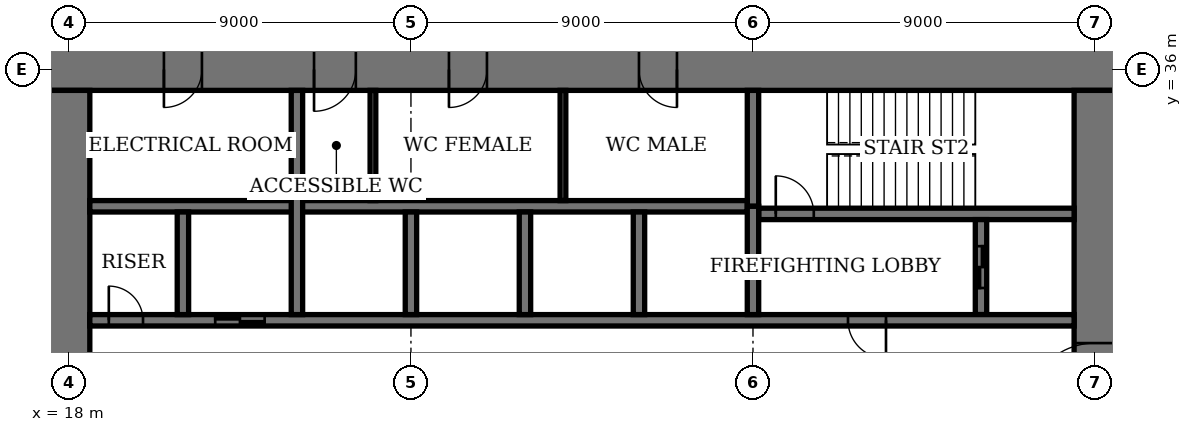
"""IFC4 building model, lengths in metres.
Left out: names, types, materials, properties, quantities, classifications, styles, units other than length and angle.
Written with IfcOpenShell. Run it as: python <this file> out.ifc"""

import sys

from ifc_helpers import new_model, si_unit, direction, frame, frame_2d, origin, place, context, subcontext, project, spatial, rectangle, extrude, element, fill, save


model = new_model("IFC4")
c1 = context("Model", 3, precision=1e-05, world=origin(), true_north=direction((0.0, 1.0)))
c2 = subcontext(c1, "Body", "Model", "MODEL_VIEW")
j1 = project(units=[si_unit("LENGTHUNIT", "METRE"), si_unit("PLANEANGLEUNIT", "RADIAN")], contexts=[c1])
p1 = place(None, origin())
s1 = spatial("IfcSite", under=j1, at=p1, CompositionType="ELEMENT")
p2 = place(p1, origin())
s2 = spatial("IfcBuilding", under=s1, at=p2, CompositionType="ELEMENT")
p3 = place(p2, frame((0.0, 0.0, 27.8)))
s3 = spatial("IfcBuildingStorey", under=s2, at=p3, CompositionType="ELEMENT", Elevation=27.8)
p4 = place(p3, frame((45.55, 36.0, 0.0), z_axis=(0.0, 0.0, 1.0), x_axis=(-1.0, 0.0, 0.0)))
e1 = element("IfcWall", 1, at=p4, inside=s3, PredefinedType="SHEAR", context=c2, shape_type="SweptSolid", body=[
    extrude(rectangle(XDim=28.1, YDim=1.1, at=frame_2d((14.05, 0.0))), origin(), (0.0, 0.0, 1.0), 4.0),
])
p5 = place(p4, frame((11.55, 0.0, 0.0)))
e2 = element("IfcOpeningElement", 2, at=p5, cuts=e1, PredefinedType="OPENING", context=c2, shape_type="SweptSolid", body=[
    extrude(rectangle(XDim=1.0, YDim=2.4, at=frame_2d((0.5, 1.2))), frame((0.0, 0.56, 0.0), z_axis=(0.0, -1.0, 0.0), x_axis=(1.0, 0.0, 0.0)), (0.0, 0.0, 1.0), 1.12),
])
p6 = place(p4, frame((16.55, 0.0, 0.0)))
e3 = element("IfcOpeningElement", 3, at=p6, cuts=e1, PredefinedType="OPENING", context=c2, shape_type="SweptSolid", body=[
    extrude(rectangle(XDim=1.0, YDim=2.4, at=frame_2d((0.5, 1.2))), frame((0.0, 0.56, 0.0), z_axis=(0.0, -1.0, 0.0), x_axis=(1.0, 0.0, 0.0)), (0.0, 0.0, 1.0), 1.12),
])
p7 = place(p4, frame((20.0, 0.0, 0.0)))
e4 = element("IfcOpeningElement", 4, at=p7, cuts=e1, PredefinedType="OPENING", context=c2, shape_type="SweptSolid", body=[
    extrude(rectangle(XDim=1.1, YDim=2.4, at=frame_2d((0.55, 1.2))), frame((0.0, 0.56, 0.0), z_axis=(0.0, -1.0, 0.0), x_axis=(1.0, 0.0, 0.0)), (0.0, 0.0, 1.0), 1.12),
])
p8 = place(p4, frame((24.05, 0.0, 0.0)))
e5 = element("IfcOpeningElement", 5, at=p8, cuts=e1, PredefinedType="OPENING", context=c2, shape_type="SweptSolid", body=[
    extrude(rectangle(XDim=1.0, YDim=2.4, at=frame_2d((0.5, 1.2))), frame((0.0, 0.56, 0.0), z_axis=(0.0, -1.0, 0.0), x_axis=(1.0, 0.0, 0.0)), (0.0, 0.0, 1.0), 1.12),
])
p9 = place(p3, frame((18.0, 35.45, 0.0), z_axis=(0.0, 0.0, 1.0), x_axis=(0.0, -1.0, 0.0)))
e6 = element("IfcWall", 6, at=p9, inside=s3, PredefinedType="SHEAR", context=c2, shape_type="SweptSolid", body=[
    extrude(rectangle(XDim=16.9, YDim=1.1, at=frame_2d((8.45, 0.0))), origin(), (0.0, 0.0, 1.0), 4.0),
])
p10 = place(p9, frame((8.45, 0.0, 0.0)))
e7 = element("IfcOpeningElement", 7, at=p10, cuts=e6, PredefinedType="OPENING", context=c2, shape_type="SweptSolid", body=[
    extrude(rectangle(XDim=1.8, YDim=2.4, at=frame_2d((0.9, 1.2))), frame((0.0, 0.56, 0.0), z_axis=(0.0, -1.0, 0.0), x_axis=(1.0, 0.0, 0.0)), (0.0, 0.0, 1.0), 1.12),
])
p11 = place(p3, frame((45.0, 18.55, 0.0), z_axis=(0.0, 0.0, 1.0), x_axis=(0.0, 1.0, 0.0)))
e8 = element("IfcWall", 8, at=p11, inside=s3, PredefinedType="SHEAR", context=c2, shape_type="SweptSolid", body=[
    extrude(rectangle(XDim=16.9, YDim=1.1, at=frame_2d((8.45, 0.0))), origin(), (0.0, 0.0, 1.0), 4.0),
])
p12 = place(p11, frame((8.45, 0.0, 0.0)))
e9 = element("IfcOpeningElement", 9, at=p12, cuts=e8, PredefinedType="OPENING", context=c2, shape_type="SweptSolid", body=[
    extrude(rectangle(XDim=1.8, YDim=2.4, at=frame_2d((0.9, 1.2))), frame((0.0, 0.56, 0.0), z_axis=(0.0, -1.0, 0.0), x_axis=(1.0, 0.0, 0.0)), (0.0, 0.0, 1.0), 1.12),
])
p13 = place(p3, frame((36.15, 32.2, 0.0), z_axis=(0.0, 0.0, 1.0), x_axis=(1.0, 0.0, 0.0)))
e10 = element("IfcWall", 10, at=p13, inside=s3, PredefinedType="SHEAR", context=c2, shape_type="SweptSolid", body=[
    extrude(rectangle(XDim=8.3, YDim=0.3, at=frame_2d((4.15, 0.0))), origin(), (0.0, 0.0, 1.0), 4.0),
])
p14 = place(p13, frame((0.45, 0.0, 0.0)))
e11 = element("IfcOpeningElement", 11, at=p14, cuts=e10, PredefinedType="OPENING", context=c2, shape_type="SweptSolid", body=[
    extrude(rectangle(XDim=1.0, YDim=2.4, at=frame_2d((0.5, 1.2))), frame((0.0, 0.16, 0.0), z_axis=(0.0, -1.0, 0.0), x_axis=(1.0, 0.0, 0.0)), (0.0, 0.0, 1.0), 0.32),
])
p15 = place(p3, frame((36.0, 32.4, 0.0), z_axis=(0.0, 0.0, 1.0), x_axis=(0.0, 1.0, 0.0)))
e12 = element("IfcWall", 12, at=p15, inside=s3, PredefinedType="SHEAR", context=c2, shape_type="SweptSolid", body=[
    extrude(rectangle(XDim=3.05, YDim=0.3, at=frame_2d((1.525, 0.0))), origin(), (0.0, 0.0, 1.0), 4.0),
])
p16 = place(p3, frame((42.0, 29.55, 0.0), z_axis=(0.0, 0.0, 1.0), x_axis=(0.0, 1.0, 0.0)))
e13 = element("IfcWall", 13, at=p16, inside=s3, PredefinedType="SHEAR", context=c2, shape_type="SweptSolid", body=[
    extrude(rectangle(XDim=2.5, YDim=0.3, at=frame_2d((1.25, 0.0))), origin(), (0.0, 0.0, 1.0), 4.0),
])
p17 = place(p16, frame((0.7, 0.0, 0.0)))
e14 = element("IfcOpeningElement", 14, at=p17, cuts=e13, PredefinedType="OPENING", context=c2, shape_type="SweptSolid", body=[
    extrude(rectangle(XDim=1.1, YDim=2.4, at=frame_2d((0.55, 1.2))), frame((0.0, 0.16, 0.0), z_axis=(0.0, -1.0, 0.0), x_axis=(1.0, 0.0, 0.0)), (0.0, 0.0, 1.0), 0.32),
])
p18 = place(p3, frame((18.55, 29.4, 0.0), z_axis=(0.0, 0.0, 1.0), x_axis=(1.0, 0.0, 0.0)))
e15 = element("IfcWall", 15, at=p18, inside=s3, PredefinedType="SHEAR", context=c2, shape_type="SweptSolid", body=[
    extrude(rectangle(XDim=25.9, YDim=0.3, at=frame_2d((12.95, 0.0))), origin(), (0.0, 0.0, 1.0), 4.0),
])
p19 = place(p18, frame((19.95, 0.0, 0.0)))
e16 = element("IfcOpeningElement", 16, at=p19, cuts=e15, PredefinedType="OPENING", context=c2, shape_type="SweptSolid", body=[
    extrude(rectangle(XDim=1.0, YDim=2.4, at=frame_2d((0.5, 1.2))), frame((0.0, 0.16, 0.0), z_axis=(0.0, -1.0, 0.0), x_axis=(1.0, 0.0, 0.0)), (0.0, 0.0, 1.0), 0.32),
])
p20 = place(p18, frame((0.5, 0.0, 0.0)))
e17 = element("IfcOpeningElement", 17, at=p20, cuts=e15, PredefinedType="OPENING", context=c2, shape_type="SweptSolid", body=[
    extrude(rectangle(XDim=0.9, YDim=2.1, at=frame_2d((0.45, 1.05))), frame((0.0, 0.16, 0.0), z_axis=(0.0, -1.0, 0.0), x_axis=(1.0, 0.0, 0.0)), (0.0, 0.0, 1.0), 0.32),
])
p21 = place(p18, frame((3.3, 0.0, 0.0)))
e18 = element("IfcOpeningElement", 18, at=p21, cuts=e15, PredefinedType="OPENING", context=c2, shape_type="SweptSolid", body=[
    extrude(rectangle(XDim=1.3, YDim=2.4, at=frame_2d((0.65, 1.2))), frame((0.0, 0.16, 0.0), z_axis=(0.0, -1.0, 0.0), x_axis=(1.0, 0.0, 0.0)), (0.0, 0.0, 1.0), 0.32),
])
p22 = place(p3, frame((18.55, 32.4, 0.0), z_axis=(0.0, 0.0, 1.0), x_axis=(1.0, 0.0, 0.0)))
e19 = element("IfcWall", 19, at=p22, inside=s3, PredefinedType="SHEAR", context=c2, shape_type="SweptSolid", body=[
    extrude(rectangle(XDim=17.3, YDim=0.3, at=frame_2d((8.65, 0.0))), origin(), (0.0, 0.0, 1.0), 4.0),
])
for number, where, z_axis, x_axis in (
    (20, (33.0, 29.55, 0.0), (0.0, 0.0, 1.0), (0.0, 1.0, 0.0)),
    (21, (30.0, 29.55, 0.0), (0.0, 0.0, 1.0), (0.0, 1.0, 0.0)),
    (22, (27.0, 29.55, 0.0), (0.0, 0.0, 1.0), (0.0, 1.0, 0.0)),
):
    element("IfcWall", number, at=place(p3, frame(where, z_axis=z_axis, x_axis=x_axis)), inside=s3, PredefinedType="SHEAR", context=c2, shape_type="SweptSolid", body=[
        extrude(rectangle(XDim=2.7, YDim=0.3, at=frame_2d((1.35, 0.0))), origin(), (0.0, 0.0, 1.0), 4.0),
    ])
p23 = place(p3, frame((24.0, 29.55, 0.0), z_axis=(0.0, 0.0, 1.0), x_axis=(0.0, 1.0, 0.0)))
e23 = element("IfcWall", 23, at=p23, inside=s3, PredefinedType="SHEAR", context=c2, shape_type="SweptSolid", body=[
    extrude(rectangle(XDim=5.9, YDim=0.3, at=frame_2d((2.95, 0.0))), origin(), (0.0, 0.0, 1.0), 4.0),
])
p24 = place(p3, frame((21.0, 29.55, 0.0), z_axis=(0.0, 0.0, 1.0), x_axis=(0.0, 1.0, 0.0)))
e24 = element("IfcWall", 24, at=p24, inside=s3, PredefinedType="SHEAR", context=c2, shape_type="SweptSolid", body=[
    extrude(rectangle(XDim=2.7, YDim=0.3, at=frame_2d((1.35, 0.0))), origin(), (0.0, 0.0, 1.0), 4.0),
])
p25 = place(p3, frame((36.0, 29.55, 0.0), z_axis=(0.0, 0.0, 1.0), x_axis=(0.0, 1.0, 0.0)))
e25 = element("IfcWall", 25, at=p25, inside=s3, PredefinedType="SHEAR", context=c2, shape_type="SweptSolid", body=[
    extrude(rectangle(XDim=2.85, YDim=0.3, at=frame_2d((1.425, 0.0))), origin(), (0.0, 0.0, 1.0), 4.0),
])
for number, where, z_axis, x_axis in (
    (26, (31.0, 32.55, 0.0), (0.0, 0.0, 1.0), (0.0, 1.0, 0.0)),
    (27, (26.0, 32.55, 0.0), (0.0, 0.0, 1.0), (0.0, 1.0, 0.0)),
):
    element("IfcWall", number, at=place(p3, frame(where, z_axis=z_axis, x_axis=x_axis)), inside=s3, PredefinedType="PARTITIONING", context=c2, shape_type="SweptSolid", body=[
        extrude(rectangle(XDim=2.9, YDim=0.15, at=frame_2d((1.45, 0.0))), origin(), (0.0, 0.0, 1.0), 3.75),
    ])
p26 = place(p12, origin())
e28 = element("IfcDoor", 28, at=p26, inside=s3, OperationType="DOUBLE_DOOR_DOUBLE_SWING", PredefinedType="DOOR", context=c2, shape_type="SweptSolid", body=[
    extrude(rectangle(XDim=1.8, YDim=2.4, at=frame_2d((0.9, 1.2))), frame((0.0, 0.03, 0.0), z_axis=(0.0, -1.0, 0.0), x_axis=(1.0, 0.0, 0.0)), (0.0, 0.0, 1.0), 0.06),
    extrude(rectangle(XDim=0.04, YDim=2.4, at=frame_2d((0.02, 1.2))), frame((0.0, 0.55, 0.0), z_axis=(0.0, -1.0, 0.0), x_axis=(1.0, 0.0, 0.0)), (0.0, 0.0, 1.0), 1.1),
    extrude(rectangle(XDim=0.04, YDim=2.4, at=frame_2d((1.78, 1.2))), frame((0.0, 0.55, 0.0), z_axis=(0.0, -1.0, 0.0), x_axis=(1.0, 0.0, 0.0)), (0.0, 0.0, 1.0), 1.1),
    extrude(rectangle(XDim=1.8, YDim=0.04, at=frame_2d((0.9, 2.38))), frame((0.0, 0.55, 0.0), z_axis=(0.0, -1.0, 0.0), x_axis=(1.0, 0.0, 0.0)), (0.0, 0.0, 1.0), 1.1),
])
fill(e9, e28)
p27 = place(p5, origin())
e29 = element("IfcDoor", 29, at=p27, inside=s3, OperationType="SINGLE_SWING_RIGHT", PredefinedType="DOOR", context=c2, shape_type="SweptSolid", body=[
    extrude(rectangle(XDim=1.0, YDim=2.4, at=frame_2d((0.5, 1.2))), frame((0.0, 0.025, 0.0), z_axis=(0.0, -1.0, 0.0), x_axis=(1.0, 0.0, 0.0)), (0.0, 0.0, 1.0), 0.05),
    extrude(rectangle(XDim=0.04, YDim=2.4, at=frame_2d((0.02, 1.2))), frame((0.0, 0.4, 0.0), z_axis=(0.0, -1.0, 0.0), x_axis=(1.0, 0.0, 0.0)), (0.0, 0.0, 1.0), 0.8),
    extrude(rectangle(XDim=0.04, YDim=2.4, at=frame_2d((0.98, 1.2))), frame((0.0, 0.4, 0.0), z_axis=(0.0, -1.0, 0.0), x_axis=(1.0, 0.0, 0.0)), (0.0, 0.0, 1.0), 0.8),
    extrude(rectangle(XDim=1.0, YDim=0.04, at=frame_2d((0.5, 2.38))), frame((0.0, 0.4, 0.0), z_axis=(0.0, -1.0, 0.0), x_axis=(1.0, 0.0, 0.0)), (0.0, 0.0, 1.0), 0.8),
])
fill(e2, e29)
p28 = place(p6, origin())
e30 = element("IfcDoor", 30, at=p28, inside=s3, OperationType="SINGLE_SWING_LEFT", PredefinedType="DOOR", context=c2, shape_type="SweptSolid", body=[
    extrude(rectangle(XDim=1.0, YDim=2.4, at=frame_2d((0.5, 1.2))), frame((0.0, 0.025, 0.0), z_axis=(0.0, -1.0, 0.0), x_axis=(1.0, 0.0, 0.0)), (0.0, 0.0, 1.0), 0.05),
    extrude(rectangle(XDim=0.04, YDim=2.4, at=frame_2d((0.02, 1.2))), frame((0.0, 0.4, 0.0), z_axis=(0.0, -1.0, 0.0), x_axis=(1.0, 0.0, 0.0)), (0.0, 0.0, 1.0), 0.8),
    extrude(rectangle(XDim=0.04, YDim=2.4, at=frame_2d((0.98, 1.2))), frame((0.0, 0.4, 0.0), z_axis=(0.0, -1.0, 0.0), x_axis=(1.0, 0.0, 0.0)), (0.0, 0.0, 1.0), 0.8),
    extrude(rectangle(XDim=1.0, YDim=0.04, at=frame_2d((0.5, 2.38))), frame((0.0, 0.4, 0.0), z_axis=(0.0, -1.0, 0.0), x_axis=(1.0, 0.0, 0.0)), (0.0, 0.0, 1.0), 0.8),
])
fill(e3, e30)
p29 = place(p7, origin())
e31 = element("IfcDoor", 31, at=p29, inside=s3, OperationType="SINGLE_SWING_LEFT", PredefinedType="DOOR", context=c2, shape_type="SweptSolid", body=[
    extrude(rectangle(XDim=1.1, YDim=2.4, at=frame_2d((0.55, 1.2))), frame((0.0, 0.025, 0.0), z_axis=(0.0, -1.0, 0.0), x_axis=(1.0, 0.0, 0.0)), (0.0, 0.0, 1.0), 0.05),
    extrude(rectangle(XDim=0.04, YDim=2.4, at=frame_2d((0.02, 1.2))), frame((0.0, 0.44, 0.0), z_axis=(0.0, -1.0, 0.0), x_axis=(1.0, 0.0, 0.0)), (0.0, 0.0, 1.0), 0.88),
    extrude(rectangle(XDim=0.04, YDim=2.4, at=frame_2d((1.08, 1.2))), frame((0.0, 0.44, 0.0), z_axis=(0.0, -1.0, 0.0), x_axis=(1.0, 0.0, 0.0)), (0.0, 0.0, 1.0), 0.88),
    extrude(rectangle(XDim=1.1, YDim=0.04, at=frame_2d((0.55, 2.38))), frame((0.0, 0.44, 0.0), z_axis=(0.0, -1.0, 0.0), x_axis=(1.0, 0.0, 0.0)), (0.0, 0.0, 1.0), 0.88),
])
fill(e4, e31)
p30 = place(p8, origin())
e32 = element("IfcDoor", 32, at=p30, inside=s3, OperationType="SINGLE_SWING_LEFT", PredefinedType="DOOR", context=c2, shape_type="SweptSolid", body=[
    extrude(rectangle(XDim=1.0, YDim=2.4, at=frame_2d((0.5, 1.2))), frame((0.0, 0.025, 0.0), z_axis=(0.0, -1.0, 0.0), x_axis=(1.0, 0.0, 0.0)), (0.0, 0.0, 1.0), 0.05),
    extrude(rectangle(XDim=0.04, YDim=2.4, at=frame_2d((0.02, 1.2))), frame((0.0, 0.4, 0.0), z_axis=(0.0, -1.0, 0.0), x_axis=(1.0, 0.0, 0.0)), (0.0, 0.0, 1.0), 0.8),
    extrude(rectangle(XDim=0.04, YDim=2.4, at=frame_2d((0.98, 1.2))), frame((0.0, 0.4, 0.0), z_axis=(0.0, -1.0, 0.0), x_axis=(1.0, 0.0, 0.0)), (0.0, 0.0, 1.0), 0.8),
    extrude(rectangle(XDim=1.0, YDim=0.04, at=frame_2d((0.5, 2.38))), frame((0.0, 0.4, 0.0), z_axis=(0.0, -1.0, 0.0), x_axis=(1.0, 0.0, 0.0)), (0.0, 0.0, 1.0), 0.8),
])
fill(e5, e32)
p31 = place(p14, origin())
e33 = element("IfcDoor", 33, at=p31, inside=s3, OperationType="SINGLE_SWING_RIGHT", PredefinedType="DOOR", context=c2, shape_type="SweptSolid", body=[
    extrude(rectangle(XDim=1.0, YDim=2.4, at=frame_2d((0.5, 1.2))), frame((0.0, 0.03, 0.0), z_axis=(0.0, -1.0, 0.0), x_axis=(1.0, 0.0, 0.0)), (0.0, 0.0, 1.0), 0.06),
])
fill(e11, e33)
p32 = place(p19, origin())
e34 = element("IfcDoor", 34, at=p32, inside=s3, OperationType="SINGLE_SWING_RIGHT", PredefinedType="DOOR", context=c2, shape_type="SweptSolid", body=[
    extrude(rectangle(XDim=1.0, YDim=2.4, at=frame_2d((0.5, 1.2))), frame((0.0, 0.03, 0.0), z_axis=(0.0, -1.0, 0.0), x_axis=(1.0, 0.0, 0.0)), (0.0, 0.0, 1.0), 0.06),
])
fill(e16, e34)
p33 = place(p20, origin())
e35 = element("IfcDoor", 35, at=p33, inside=s3, OperationType="SINGLE_SWING_RIGHT", PredefinedType="DOOR", context=c2, shape_type="SweptSolid", body=[
    extrude(rectangle(XDim=0.9, YDim=2.1, at=frame_2d((0.45, 1.05))), frame((0.0, 0.03, 0.0), z_axis=(0.0, -1.0, 0.0), x_axis=(1.0, 0.0, 0.0)), (0.0, 0.0, 1.0), 0.06),
])
fill(e17, e35)
p34 = place(p21, origin())
e36 = element("IfcDoor", 36, at=p34, inside=s3, OperationType="DOUBLE_DOOR_SLIDING", PredefinedType="DOOR", context=c2, shape_type="SweptSolid", body=[
    extrude(rectangle(XDim=1.3, YDim=2.4, at=frame_2d((0.65, 1.2))), frame((0.0, 0.02, 0.0), z_axis=(0.0, -1.0, 0.0), x_axis=(1.0, 0.0, 0.0)), (0.0, 0.0, 1.0), 0.04),
])
fill(e18, e36)
p35 = place(p17, origin())
e37 = element("IfcDoor", 37, at=p35, inside=s3, OperationType="DOUBLE_DOOR_SLIDING", PredefinedType="DOOR", context=c2, shape_type="SweptSolid", body=[
    extrude(rectangle(XDim=1.1, YDim=2.4, at=frame_2d((0.55, 1.2))), frame((0.0, 0.03, 0.0), z_axis=(0.0, -1.0, 0.0), x_axis=(1.0, 0.0, 0.0)), (0.0, 0.0, 1.0), 0.06),
])
fill(e14, e37)
save(model, sys.argv[1])
